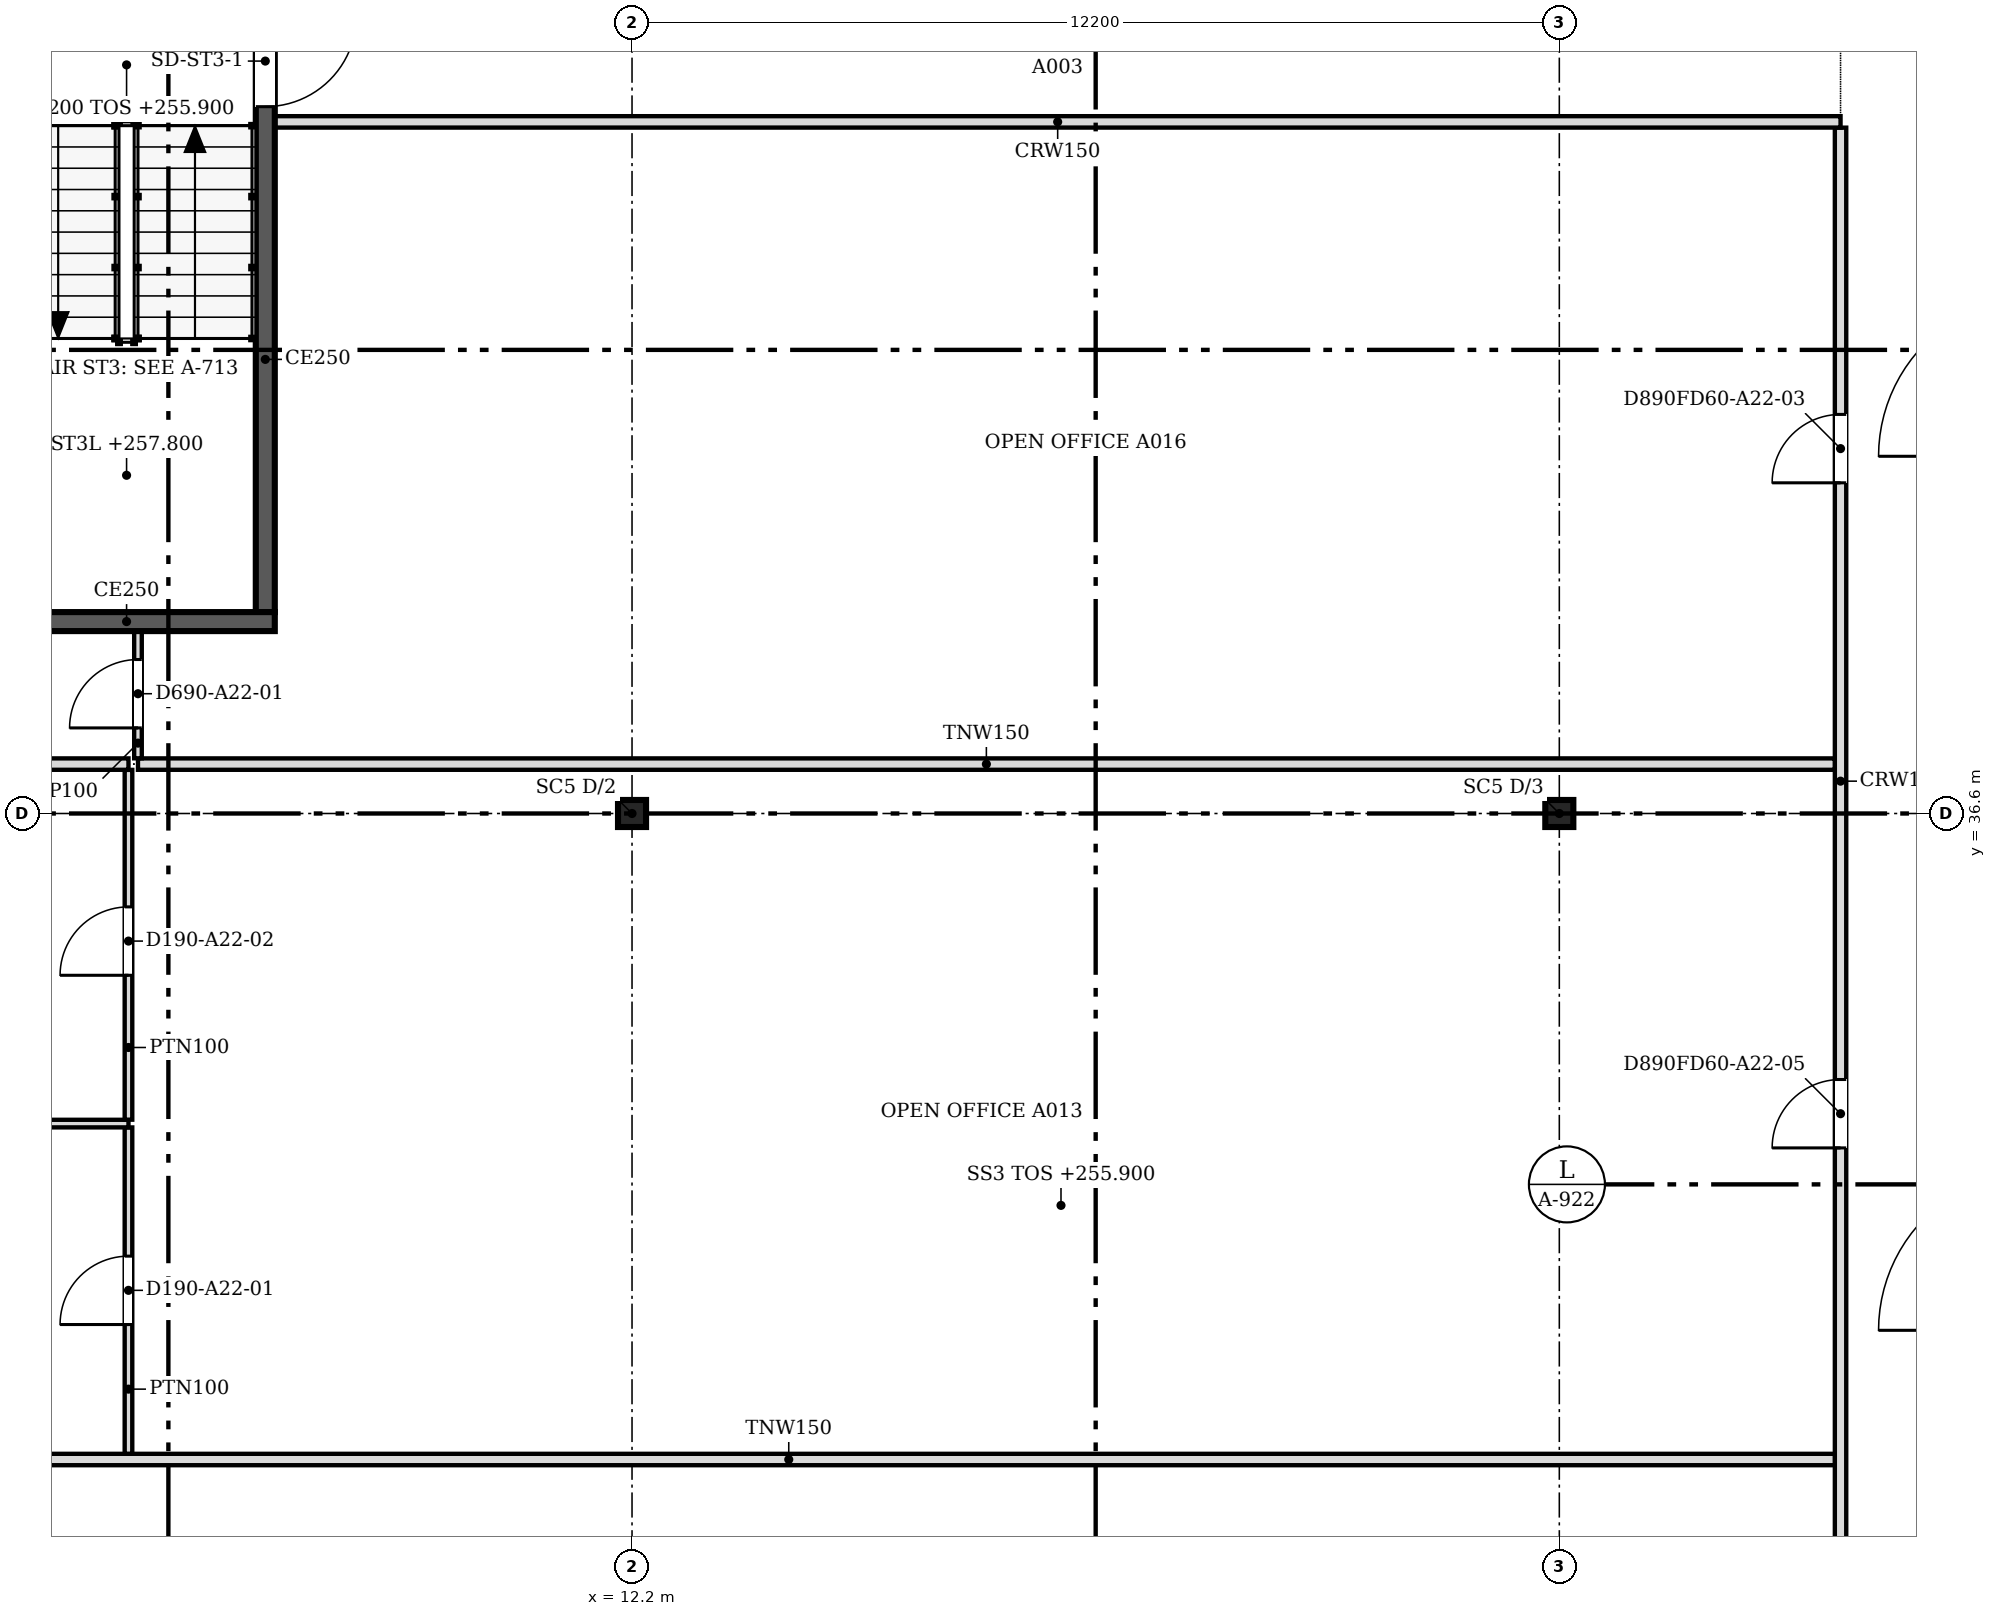
"""IFC4 building model, lengths in metres.
Left out: names, types, materials, properties, quantities, classifications, styles, units other than length and angle.
Written with IfcOpenShell. Run it as: python <this file> out.ifc"""

import sys

from ifc_helpers import new_model, si_unit, direction, frame, frame_2d, origin, origin_2d, place, context, subcontext, project, spatial, rectangle, i_section, extrude, source, transform, mapped, element, fill, save


model = new_model("IFC4")
c1 = context("Model", 3, precision=1e-05, world=origin(), true_north=direction((0.0, 1.0)))
c2 = subcontext(c1, "Body", "Model", "MODEL_VIEW")
j1 = project(units=[si_unit("LENGTHUNIT", "METRE"), si_unit("PLANEANGLEUNIT", "RADIAN")], contexts=[c1])
p1 = place(None, origin())
s1 = spatial("IfcSite", under=j1, at=p1, CompositionType="ELEMENT")
p2 = place(p1, origin())
s2 = spatial("IfcBuilding", under=s1, at=p2, CompositionType="ELEMENT")
p3 = place(p2, frame((0.0, 0.0, 255.9)))
s3 = spatial("IfcBuildingStorey", under=s2, at=p3, CompositionType="ELEMENT", Elevation=255.9)
for number, where, z_axis, x_axis in (
    (1, (12.2, 36.6, 0.0), (0.0, 0.0, 1.0), (1.0, 0.0, 0.0)),
    (2, (24.4, 36.6, 0.0), (0.0, 0.0, 1.0), (1.0, 0.0, 0.0)),
):
    element("IfcColumn", number, at=place(p3, frame(where, z_axis=z_axis, x_axis=x_axis)), inside=s3, PredefinedType="COLUMN", context=c2, shape_type="SweptSolid", body=[
        extrude(i_section(OverallWidth=0.369, OverallDepth=0.356, WebThickness=0.011, FlangeThickness=0.018, at=origin_2d()), origin(), (0.0, 0.0, 1.0), 3.55),
    ])
p4 = place(p3, frame((7.5, 39.125, 0.0), z_axis=(0.0, 0.0, 1.0), x_axis=(-1.0, 0.0, 0.0)))
e3 = element("IfcWall", 3, at=p4, inside=s3, PredefinedType="SOLIDWALL", context=c2, shape_type="SweptSolid", body=[
    extrude(rectangle(XDim=3.9, YDim=0.25, at=frame_2d((1.95, 0.0))), origin(), (0.0, 0.0, 1.0), 3.8),
])
p5 = place(p3, frame((7.375, 47.25, 0.0), z_axis=(0.0, 0.0, 1.0), x_axis=(0.0, -1.0, 0.0)))
e4 = element("IfcWall", 4, at=p5, inside=s3, PredefinedType="SOLIDWALL", context=c2, shape_type="SweptSolid", body=[
    extrude(rectangle(XDim=8.0, YDim=0.25, at=frame_2d((4.0, 0.0))), origin(), (0.0, 0.0, 1.0), 3.8),
])
m1 = source(origin(), c2, "Body", "SweptSolid", [
    extrude(rectangle(XDim=1.2, YDim=2.1, at=frame_2d((0.6, 1.05))), frame((0.0, 0.135, 0.0), z_axis=(0.0, -1.0, 0.0), x_axis=(1.0, 0.0, 0.0)), (0.0, 0.0, 1.0), 0.27),
])
p6 = place(p5, frame((0.15, 0.0, 0.0)))
e5 = element("IfcOpeningElement", 5, at=p6, cuts=e4, PredefinedType="OPENING", context=c2, shape_type="MappedRepresentation", body=[
    mapped(m1, transform((0.0, 0.0, 0.0), scale=1.0)),
])
p7 = place(p3, frame((28.1, 22.076, 0.0), z_axis=(0.0, 0.0, 1.0), x_axis=(0.0, 1.0, 0.0)))
e6 = element("IfcWall", 6, at=p7, inside=s3, PredefinedType="PARTITIONING", context=c2, shape_type="SweptSolid", body=[
    extrude(rectangle(XDim=23.548, YDim=0.15, at=frame_2d((11.774, 0.0))), origin(), (0.0, 0.0, 1.0), 2.947),
])
m2 = source(origin(), c2, "Body", "SweptSolid", [
    extrude(rectangle(XDim=1.0, YDim=2.1, at=frame_2d((0.5, 1.05))), frame((0.0, 0.085, 0.0), z_axis=(0.0, -1.0, 0.0), x_axis=(1.0, 0.0, 0.0)), (0.0, 0.0, 1.0), 0.17),
])
p8 = place(p7, frame((2.5, 0.0, 0.0)))
e7 = element("IfcOpeningElement", 7, at=p8, cuts=e6, PredefinedType="OPENING", context=c2, shape_type="MappedRepresentation", body=[
    mapped(m2, transform((0.0, 0.0, 0.0), scale=1.0)),
])
m3 = source(origin(), c2, "Body", "SweptSolid", [
    extrude(rectangle(XDim=0.9, YDim=2.1, at=frame_2d((0.45, 1.05))), frame((0.0, 0.085, 0.0), z_axis=(0.0, -1.0, 0.0), x_axis=(1.0, 0.0, 0.0)), (0.0, 0.0, 1.0), 0.17),
])
p9 = place(p7, frame((18.875, 0.0, 0.0)))
e8 = element("IfcOpeningElement", 8, at=p9, cuts=e6, PredefinedType="OPENING", context=c2, shape_type="MappedRepresentation", body=[
    mapped(m3, transform((0.0, 0.0, 0.0), scale=1.0)),
])
p10 = place(p7, frame((10.124, 0.0, 0.0)))
e9 = element("IfcOpeningElement", 9, at=p10, cuts=e6, PredefinedType="OPENING", context=c2, shape_type="MappedRepresentation", body=[
    mapped(m3, transform((0.0, 0.0, 0.0), scale=1.0)),
])
p11 = place(p3, frame((0.5, 28.1, 0.0), z_axis=(0.0, 0.0, 1.0), x_axis=(1.0, 0.0, 0.0)))
e10 = element("IfcWall", 10, at=p11, inside=s3, PredefinedType="PARTITIONING", context=c2, shape_type="SweptSolid", body=[
    extrude(rectangle(XDim=27.524, YDim=0.15, at=frame_2d((13.762, 0.0))), origin(), (0.0, 0.0, 1.0), 2.947),
])
p12 = place(p3, frame((5.575, 28.176, 0.0), z_axis=(0.0, 0.0, 1.0), x_axis=(0.0, 1.0, 0.0)))
e11 = element("IfcWall", 11, at=p12, inside=s3, PredefinedType="PARTITIONING", context=c2, shape_type="SweptSolid", body=[
    extrude(rectangle(XDim=4.293, YDim=0.1, at=frame_2d((2.146, 0.0))), origin(), (0.0, 0.0, 1.0), 2.947),
])
m4 = source(origin(), c2, "Body", "SweptSolid", [
    extrude(rectangle(XDim=0.9, YDim=2.1, at=frame_2d((0.45, 1.05))), frame((0.0, 0.06, 0.0), z_axis=(0.0, -1.0, 0.0), x_axis=(1.0, 0.0, 0.0)), (0.0, 0.0, 1.0), 0.12),
])
p13 = place(p12, frame((1.7, 0.0, 0.0)))
e12 = element("IfcOpeningElement", 12, at=p13, cuts=e11, PredefinedType="OPENING", context=c2, shape_type="MappedRepresentation", body=[
    mapped(m4, transform((0.0, 0.0, 0.0), scale=1.0)),
])
p14 = place(p3, frame((0.5, 32.52, 0.0), z_axis=(0.0, 0.0, 1.0), x_axis=(1.0, 0.0, 0.0)))
e13 = element("IfcWall", 13, at=p14, inside=s3, PredefinedType="PARTITIONING", context=c2, shape_type="SweptSolid", body=[
    extrude(rectangle(XDim=5.075, YDim=0.1, at=frame_2d((2.538, 0.0))), origin(), (0.0, 0.0, 1.0), 2.947),
])
p15 = place(p3, frame((5.575, 32.571, 0.0), z_axis=(0.0, 0.0, 1.0), x_axis=(0.0, 1.0, 0.0)))
e14 = element("IfcWall", 14, at=p15, inside=s3, PredefinedType="PARTITIONING", context=c2, shape_type="SweptSolid", body=[
    extrude(rectangle(XDim=4.603, YDim=0.1, at=frame_2d((2.301, 0.0))), origin(), (0.0, 0.0, 1.0), 2.947),
])
p16 = place(p15, frame((1.9, 0.0, 0.0)))
e15 = element("IfcOpeningElement", 15, at=p16, cuts=e14, PredefinedType="OPENING", context=c2, shape_type="MappedRepresentation", body=[
    mapped(m4, transform((0.0, 0.0, 0.0), scale=1.0)),
])
p17 = place(p3, frame((0.5, 37.25, 0.0), z_axis=(0.0, 0.0, 1.0), x_axis=(1.0, 0.0, 0.0)))
e16 = element("IfcWall", 16, at=p17, inside=s3, PredefinedType="PARTITIONING", context=c2, shape_type="SweptSolid", body=[
    extrude(rectangle(XDim=5.075, YDim=0.15, at=frame_2d((2.538, 0.0))), origin(), (0.0, 0.0, 1.0), 2.947),
])
p18 = place(p3, frame((5.7, 37.25, 0.0), z_axis=(0.0, 0.0, 1.0), x_axis=(1.0, 0.0, 0.0)))
e17 = element("IfcWall", 17, at=p18, inside=s3, PredefinedType="PARTITIONING", context=c2, shape_type="SweptSolid", body=[
    extrude(rectangle(XDim=22.324, YDim=0.15, at=frame_2d((11.162, 0.0))), origin(), (0.0, 0.0, 1.0), 2.947),
])
p19 = place(p3, frame((5.7, 37.326, 0.0), z_axis=(0.0, 0.0, 1.0), x_axis=(0.0, 1.0, 0.0)))
e18 = element("IfcWall", 18, at=p19, inside=s3, PredefinedType="PARTITIONING", context=c2, shape_type="SweptSolid", body=[
    extrude(rectangle(XDim=1.674, YDim=0.1, at=frame_2d((0.837, 0.0))), origin(), (0.0, 0.0, 1.0), 2.947),
])
p20 = place(p19, frame((0.4, 0.0, 0.0)))
e19 = element("IfcOpeningElement", 19, at=p20, cuts=e18, PredefinedType="OPENING", context=c2, shape_type="MappedRepresentation", body=[
    mapped(m4, transform((0.0, 0.0, 0.0), scale=1.0)),
])
p21 = place(p3, frame((7.5, 45.7, 0.0), z_axis=(0.0, 0.0, 1.0), x_axis=(1.0, 0.0, 0.0)))
e20 = element("IfcWall", 20, at=p21, inside=s3, PredefinedType="PARTITIONING", context=c2, shape_type="SweptSolid", body=[
    extrude(rectangle(XDim=20.6, YDim=0.15, at=frame_2d((10.3, 0.0))), origin(), (0.0, 0.0, 1.0), 2.947),
])
m5 = source(origin(), c2, "Body", "SweptSolid", [
    extrude(rectangle(XDim=1.2, YDim=2.1, at=frame_2d((0.6, 1.05))), frame((0.0, 0.025, 0.0), z_axis=(0.0, -1.0, 0.0), x_axis=(1.0, 0.0, 0.0)), (0.0, 0.0, 1.0), 0.05),
])
p22 = place(p6, origin())
e21 = element("IfcDoor", 21, at=p22, inside=s3, OperationType="SINGLE_SWING_LEFT", PredefinedType="DOOR", context=c2, shape_type="MappedRepresentation", body=[
    mapped(m5, transform((0.0, 0.0, 0.0), scale=1.0)),
])
fill(e5, e21)
m6 = source(origin(), c2, "Body", "SweptSolid", [
    extrude(rectangle(XDim=0.9, YDim=2.1, at=frame_2d((0.45, 1.05))), frame((0.0, 0.025, 0.0), z_axis=(0.0, -1.0, 0.0), x_axis=(1.0, 0.0, 0.0)), (0.0, 0.0, 1.0), 0.05),
])
p23 = place(p20, origin())
e22 = element("IfcDoor", 22, at=p23, inside=s3, OperationType="SINGLE_SWING_LEFT", PredefinedType="DOOR", context=c2, shape_type="MappedRepresentation", body=[
    mapped(m6, transform((0.0, 0.0, 0.0), scale=1.0)),
])
fill(e19, e22)
p24 = place(p13, origin())
e23 = element("IfcDoor", 23, at=p24, inside=s3, OperationType="SINGLE_SWING_LEFT", PredefinedType="DOOR", context=c2, shape_type="MappedRepresentation", body=[
    mapped(m6, transform((0.0, 0.0, 0.0), scale=1.0)),
])
fill(e12, e23)
p25 = place(p16, origin())
e24 = element("IfcDoor", 24, at=p25, inside=s3, OperationType="SINGLE_SWING_LEFT", PredefinedType="DOOR", context=c2, shape_type="MappedRepresentation", body=[
    mapped(m6, transform((0.0, 0.0, 0.0), scale=1.0)),
])
fill(e15, e24)
p26 = place(p9, origin())
e25 = element("IfcDoor", 25, at=p26, inside=s3, OperationType="SINGLE_SWING_LEFT", PredefinedType="DOOR", context=c2, shape_type="MappedRepresentation", body=[
    mapped(m6, transform((0.0, 0.0, 0.0), scale=1.0)),
])
fill(e8, e25)
p27 = place(p10, origin())
e26 = element("IfcDoor", 26, at=p27, inside=s3, OperationType="SINGLE_SWING_LEFT", PredefinedType="DOOR", context=c2, shape_type="MappedRepresentation", body=[
    mapped(m6, transform((0.0, 0.0, 0.0), scale=1.0)),
])
fill(e9, e26)
save(model, sys.argv[1])
